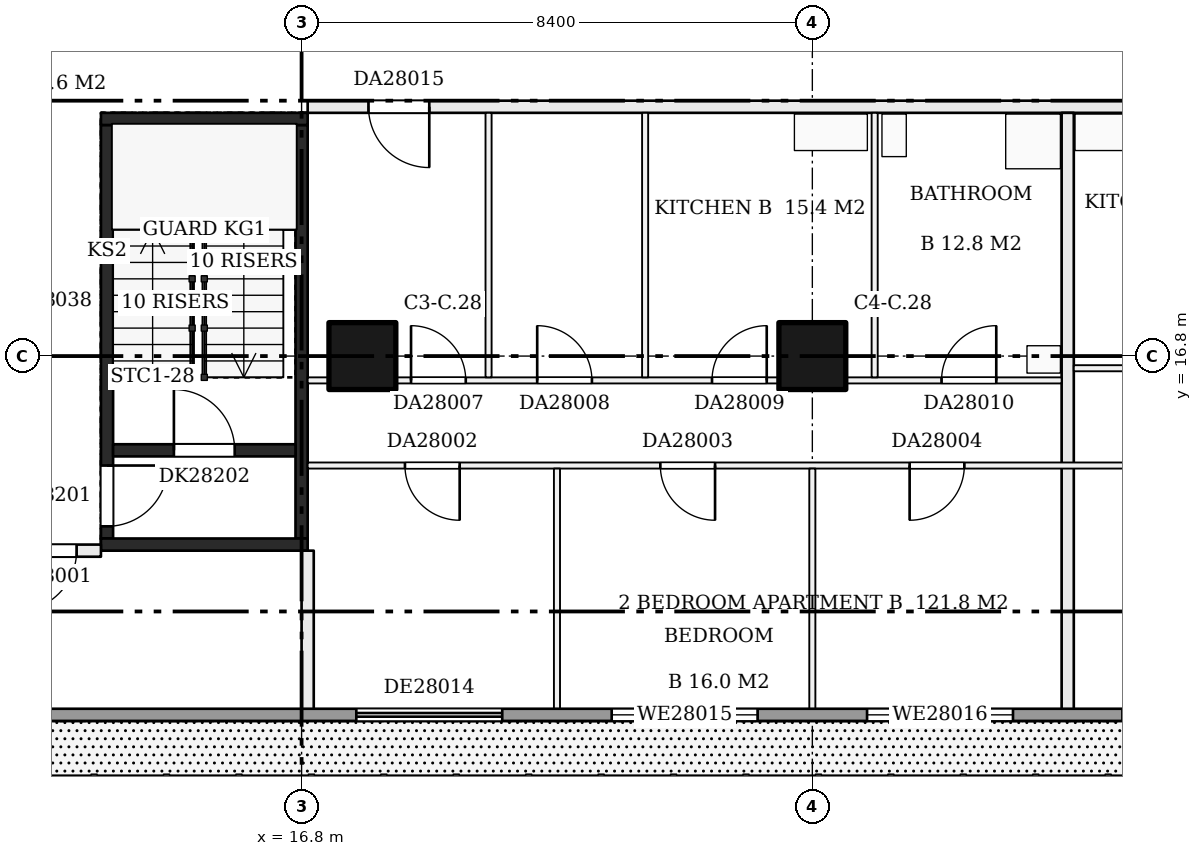
"""IFC4 building model, lengths in metres.
Left out: names, types, materials, properties, quantities, classifications, styles, units other than length and angle.
Written with IfcOpenShell. Run it as: python <this file> out.ifc"""

import sys

from ifc_helpers import new_model, si_unit, direction, frame, frame_2d, origin, origin_2d, place, context, subcontext, project, spatial, rectangle, extrude, element, fill, save


model = new_model("IFC4")
c1 = context("Model", 3, precision=1e-05, world=origin(), true_north=direction((0.0, 1.0)))
c2 = subcontext(c1, "Body", "Model", "MODEL_VIEW")
j1 = project(units=[si_unit("LENGTHUNIT", "METRE"), si_unit("PLANEANGLEUNIT", "RADIAN")], contexts=[c1])
p1 = place(None, origin())
s1 = spatial("IfcSite", under=j1, at=p1, CompositionType="ELEMENT")
p2 = place(p1, origin())
s2 = spatial("IfcBuilding", under=s1, at=p2, CompositionType="ELEMENT")
p3 = place(p2, frame((0.0, 0.0, 112.7)))
s3 = spatial("IfcBuildingStorey", under=s2, at=p3, CompositionType="ELEMENT", Elevation=112.7)
for number, where, z_axis, x_axis in (
    (1, (17.8, 16.8, 0.0), (0.0, 0.0, 1.0), (1.0, 0.0, 0.0)),
    (2, (25.2, 16.8, 0.0), (0.0, 0.0, 1.0), (1.0, 0.0, 0.0)),
):
    element("IfcColumn", number, at=place(p3, frame(where, z_axis=z_axis, x_axis=x_axis)), inside=s3, PredefinedType="COLUMN", context=c2, shape_type="SweptSolid", body=[
        extrude(rectangle(XDim=1.1, YDim=1.1, at=origin_2d()), origin(), (0.0, 0.0, 1.0), 3.22),
    ])
p4 = place(p3, frame((13.6, 13.8, 0.0), z_axis=(0.0, 0.0, 1.0), x_axis=(0.0, 1.0, 0.0)))
e3 = element("IfcWall", 3, at=p4, inside=s3, PredefinedType="SHEAR", context=c2, shape_type="SweptSolid", body=[
    extrude(rectangle(XDim=6.8, YDim=0.2, at=frame_2d((3.4, 0.0))), origin(), (0.0, 0.0, 1.0), 3.22),
])
p5 = place(p4, frame((0.2, 0.0, 0.0)))
e4 = element("IfcOpeningElement", 4, at=p5, cuts=e3, PredefinedType="OPENING", context=c2, shape_type="SweptSolid", body=[
    extrude(rectangle(XDim=1.0, YDim=2.1, at=frame_2d((0.5, 1.05))), frame((0.0, 0.11, 0.0), z_axis=(0.0, -1.0, 0.0), x_axis=(1.0, 0.0, 0.0)), (0.0, 0.0, 1.0), 0.22),
])
p6 = place(p3, frame((16.8, 13.8, 0.0), z_axis=(0.0, 0.0, 1.0), x_axis=(0.0, 1.0, 0.0)))
e5 = element("IfcWall", 5, at=p6, inside=s3, PredefinedType="SHEAR", context=c2, shape_type="SweptSolid", body=[
    extrude(rectangle(XDim=6.8, YDim=0.2, at=frame_2d((3.4, 0.0))), origin(), (0.0, 0.0, 1.0), 3.22),
])
for number, where, z_axis, x_axis in (
    (6, (13.5, 13.7, 0.0), (0.0, 0.0, 1.0), (1.0, 0.0, 0.0)),
    (7, (13.5, 20.7, 0.0), (0.0, 0.0, 1.0), (1.0, 0.0, 0.0)),
):
    element("IfcWall", number, at=place(p3, frame(where, z_axis=z_axis, x_axis=x_axis)), inside=s3, PredefinedType="SHEAR", context=c2, shape_type="SweptSolid", body=[
        extrude(rectangle(XDim=3.4, YDim=0.2, at=frame_2d((1.7, 0.0))), origin(), (0.0, 0.0, 1.0), 3.22),
    ])
p7 = place(p3, frame((13.7, 15.25, 0.0), z_axis=(0.0, 0.0, 1.0), x_axis=(1.0, 0.0, 0.0)))
e8 = element("IfcWall", 8, at=p7, inside=s3, PredefinedType="SHEAR", context=c2, shape_type="SweptSolid", body=[
    extrude(rectangle(XDim=3.0, YDim=0.2, at=frame_2d((1.5, 0.0))), origin(), (0.0, 0.0, 1.0), 3.22),
])
p8 = place(p7, frame((1.0, 0.0, 0.0)))
e9 = element("IfcOpeningElement", 9, at=p8, cuts=e8, PredefinedType="OPENING", context=c2, shape_type="SweptSolid", body=[
    extrude(rectangle(XDim=1.0, YDim=2.1, at=frame_2d((0.5, 1.05))), frame((0.0, 0.11, 0.0), z_axis=(0.0, -1.0, 0.0), x_axis=(1.0, 0.0, 0.0)), (0.0, 0.0, 1.0), 0.22),
])
p9 = place(p3, frame((11.7, 13.6, 0.0), z_axis=(0.0, 0.0, 1.0), x_axis=(1.0, 0.0, 0.0)))
e10 = element("IfcWall", 10, at=p9, inside=s3, PredefinedType="PARTITIONING", context=c2, shape_type="SweptSolid", body=[
    extrude(rectangle(XDim=1.8, YDim=0.2, at=frame_2d((0.9, 0.0))), origin(), (0.0, 0.0, 1.0), 3.22),
])
p10 = place(p9, frame((0.4, 0.0, 0.0)))
e11 = element("IfcOpeningElement", 11, at=p10, cuts=e10, PredefinedType="OPENING", context=c2, shape_type="SweptSolid", body=[
    extrude(rectangle(XDim=1.0, YDim=2.1, at=frame_2d((0.5, 1.05))), frame((0.0, 0.11, 0.0), z_axis=(0.0, -1.0, 0.0), x_axis=(1.0, 0.0, 0.0)), (0.0, 0.0, 1.0), 0.22),
])
p11 = place(p3, frame((16.9, 15.0, 0.0), z_axis=(0.0, 0.0, 1.0), x_axis=(1.0, 0.0, 0.0)))
e12 = element("IfcWall", 12, at=p11, inside=s3, PredefinedType="PARTITIONING", context=c2, shape_type="SweptSolid", body=[
    extrude(rectangle(XDim=23.1, YDim=0.1, at=frame_2d((11.55, 0.0))), origin(), (0.0, 0.0, 1.0), 3.22),
])
p12 = place(p11, frame((1.6, 0.0, 0.0)))
e13 = element("IfcOpeningElement", 13, at=p12, cuts=e12, PredefinedType="OPENING", context=c2, shape_type="SweptSolid", body=[
    extrude(rectangle(XDim=0.9, YDim=2.1, at=frame_2d((0.45, 1.05))), frame((0.0, 0.06, 0.0), z_axis=(0.0, -1.0, 0.0), x_axis=(1.0, 0.0, 0.0)), (0.0, 0.0, 1.0), 0.12),
])
p13 = place(p11, frame((5.8, 0.0, 0.0)))
e14 = element("IfcOpeningElement", 14, at=p13, cuts=e12, PredefinedType="OPENING", context=c2, shape_type="SweptSolid", body=[
    extrude(rectangle(XDim=0.9, YDim=2.1, at=frame_2d((0.45, 1.05))), frame((0.0, 0.06, 0.0), z_axis=(0.0, -1.0, 0.0), x_axis=(1.0, 0.0, 0.0)), (0.0, 0.0, 1.0), 0.12),
])
p14 = place(p11, frame((9.9, 0.0, 0.0)))
e15 = element("IfcOpeningElement", 15, at=p14, cuts=e12, PredefinedType="OPENING", context=c2, shape_type="SweptSolid", body=[
    extrude(rectangle(XDim=0.9, YDim=2.1, at=frame_2d((0.45, 1.05))), frame((0.0, 0.06, 0.0), z_axis=(0.0, -1.0, 0.0), x_axis=(1.0, 0.0, 0.0)), (0.0, 0.0, 1.0), 0.12),
])
p15 = place(p11, frame((14.1, 0.0, 0.0)))
e16 = element("IfcOpeningElement", 16, at=p15, cuts=e12, PredefinedType="OPENING", context=c2, shape_type="SweptSolid", body=[
    extrude(rectangle(XDim=0.9, YDim=2.1, at=frame_2d((0.45, 1.05))), frame((0.0, 0.06, 0.0), z_axis=(0.0, -1.0, 0.0), x_axis=(1.0, 0.0, 0.0)), (0.0, 0.0, 1.0), 0.12),
])
p16 = place(p11, frame((19.5, 0.0, 0.0)))
e17 = element("IfcOpeningElement", 17, at=p16, cuts=e12, PredefinedType="OPENING", context=c2, shape_type="SweptSolid", body=[
    extrude(rectangle(XDim=0.9, YDim=2.1, at=frame_2d((0.45, 1.05))), frame((0.0, 0.06, 0.0), z_axis=(0.0, -1.0, 0.0), x_axis=(1.0, 0.0, 0.0)), (0.0, 0.0, 1.0), 0.12),
])
p17 = place(p3, frame((16.9, 16.4, 0.0), z_axis=(0.0, 0.0, 1.0), x_axis=(1.0, 0.0, 0.0)))
e18 = element("IfcWall", 18, at=p17, inside=s3, PredefinedType="PARTITIONING", context=c2, shape_type="SweptSolid", body=[
    extrude(rectangle(XDim=12.4, YDim=0.1, at=frame_2d((6.2, 0.0))), origin(), (0.0, 0.0, 1.0), 3.22),
])
p18 = place(p17, frame((1.7, 0.0, 0.0)))
e19 = element("IfcOpeningElement", 19, at=p18, cuts=e18, PredefinedType="OPENING", context=c2, shape_type="SweptSolid", body=[
    extrude(rectangle(XDim=0.9, YDim=2.1, at=frame_2d((0.45, 1.05))), frame((0.0, 0.06, 0.0), z_axis=(0.0, -1.0, 0.0), x_axis=(1.0, 0.0, 0.0)), (0.0, 0.0, 1.0), 0.12),
])
p19 = place(p17, frame((3.775, 0.0, 0.0)))
e20 = element("IfcOpeningElement", 20, at=p19, cuts=e18, PredefinedType="OPENING", context=c2, shape_type="SweptSolid", body=[
    extrude(rectangle(XDim=0.9, YDim=2.1, at=frame_2d((0.45, 1.05))), frame((0.0, 0.06, 0.0), z_axis=(0.0, -1.0, 0.0), x_axis=(1.0, 0.0, 0.0)), (0.0, 0.0, 1.0), 0.12),
])
p20 = place(p17, frame((6.65, 0.0, 0.0)))
e21 = element("IfcOpeningElement", 21, at=p20, cuts=e18, PredefinedType="OPENING", context=c2, shape_type="SweptSolid", body=[
    extrude(rectangle(XDim=0.9, YDim=2.1, at=frame_2d((0.45, 1.05))), frame((0.0, 0.06, 0.0), z_axis=(0.0, -1.0, 0.0), x_axis=(1.0, 0.0, 0.0)), (0.0, 0.0, 1.0), 0.12),
])
p21 = place(p17, frame((10.425, 0.0, 0.0)))
e22 = element("IfcOpeningElement", 22, at=p21, cuts=e18, PredefinedType="OPENING", context=c2, shape_type="SweptSolid", body=[
    extrude(rectangle(XDim=0.9, YDim=2.1, at=frame_2d((0.45, 1.05))), frame((0.0, 0.06, 0.0), z_axis=(0.0, -1.0, 0.0), x_axis=(1.0, 0.0, 0.0)), (0.0, 0.0, 1.0), 0.12),
])
p22 = place(p3, frame((29.5, 16.6, 0.0), z_axis=(0.0, 0.0, 1.0), x_axis=(1.0, 0.0, 0.0)))
e23 = element("IfcWall", 23, at=p22, inside=s3, PredefinedType="PARTITIONING", context=c2, shape_type="SweptSolid", body=[
    extrude(rectangle(XDim=10.5, YDim=0.1, at=frame_2d((5.25, 0.0))), origin(), (0.0, 0.0, 1.0), 3.22),
])
p23 = place(p22, frame((5.133, 0.0, 0.0)))
e24 = element("IfcOpeningElement", 24, at=p23, cuts=e23, PredefinedType="OPENING", context=c2, shape_type="SweptSolid", body=[
    extrude(rectangle(XDim=0.9, YDim=2.1, at=frame_2d((0.45, 1.05))), frame((0.0, 0.06, 0.0), z_axis=(0.0, -1.0, 0.0), x_axis=(1.0, 0.0, 0.0)), (0.0, 0.0, 1.0), 0.12),
])
p24 = place(p22, frame((1.5, 0.0, 0.0)))
e25 = element("IfcOpeningElement", 25, at=p24, cuts=e23, PredefinedType="OPENING", context=c2, shape_type="SweptSolid", body=[
    extrude(rectangle(XDim=0.9, YDim=2.1, at=frame_2d((0.45, 1.05))), frame((0.0, 0.06, 0.0), z_axis=(0.0, -1.0, 0.0), x_axis=(1.0, 0.0, 0.0)), (0.0, 0.0, 1.0), 0.12),
])
p25 = place(p22, frame((8.467, 0.0, 0.0)))
e26 = element("IfcOpeningElement", 26, at=p25, cuts=e23, PredefinedType="OPENING", context=c2, shape_type="SweptSolid", body=[
    extrude(rectangle(XDim=0.9, YDim=2.1, at=frame_2d((0.45, 1.05))), frame((0.0, 0.06, 0.0), z_axis=(0.0, -1.0, 0.0), x_axis=(1.0, 0.0, 0.0)), (0.0, 0.0, 1.0), 0.12),
])
p26 = place(p3, frame((16.9, 20.9, 0.0), z_axis=(0.0, 0.0, 1.0), x_axis=(1.0, 0.0, 0.0)))
e27 = element("IfcWall", 27, at=p26, inside=s3, PredefinedType="PARTITIONING", context=c2, shape_type="SweptSolid", body=[
    extrude(rectangle(XDim=23.3, YDim=0.2, at=frame_2d((11.65, 0.0))), origin(), (0.0, 0.0, 1.0), 3.22),
])
p27 = place(p26, frame((1.0, 0.0, 0.0)))
e28 = element("IfcOpeningElement", 28, at=p27, cuts=e27, PredefinedType="OPENING", context=c2, shape_type="SweptSolid", body=[
    extrude(rectangle(XDim=1.0, YDim=2.1, at=frame_2d((0.5, 1.05))), frame((0.0, 0.11, 0.0), z_axis=(0.0, -1.0, 0.0), x_axis=(1.0, 0.0, 0.0)), (0.0, 0.0, 1.0), 0.22),
])
p28 = place(p26, frame((17.633, 0.0, 0.0)))
e29 = element("IfcOpeningElement", 29, at=p28, cuts=e27, PredefinedType="OPENING", context=c2, shape_type="SweptSolid", body=[
    extrude(rectangle(XDim=1.0, YDim=2.1, at=frame_2d((0.5, 1.05))), frame((0.0, 0.11, 0.0), z_axis=(0.0, -1.0, 0.0), x_axis=(1.0, 0.0, 0.0)), (0.0, 0.0, 1.0), 0.22),
])
p29 = place(p3, frame((16.9, 10.9, 0.0), z_axis=(0.0, 0.0, 1.0), x_axis=(0.0, 1.0, 0.0)))
e30 = element("IfcWall", 30, at=p29, inside=s3, PredefinedType="PARTITIONING", context=c2, shape_type="SweptSolid", body=[
    extrude(rectangle(XDim=2.7, YDim=0.2, at=frame_2d((1.35, 0.0))), origin(), (0.0, 0.0, 1.0), 3.22),
])
p30 = place(p3, frame((19.875, 16.45, 0.0), z_axis=(0.0, 0.0, 1.0), x_axis=(0.0, 1.0, 0.0)))
e31 = element("IfcWall", 31, at=p30, inside=s3, PredefinedType="PARTITIONING", context=c2, shape_type="SweptSolid", body=[
    extrude(rectangle(XDim=4.35, YDim=0.1, at=frame_2d((2.175, 0.0))), origin(), (0.0, 0.0, 1.0), 3.22),
])
p31 = place(p3, frame((21.0, 10.9, 0.0), z_axis=(0.0, 0.0, 1.0), x_axis=(0.0, 1.0, 0.0)))
e32 = element("IfcWall", 32, at=p31, inside=s3, PredefinedType="PARTITIONING", context=c2, shape_type="SweptSolid", body=[
    extrude(rectangle(XDim=4.05, YDim=0.1, at=frame_2d((2.025, 0.0))), origin(), (0.0, 0.0, 1.0), 3.22),
])
p32 = place(p3, frame((22.45, 16.45, 0.0), z_axis=(0.0, 0.0, 1.0), x_axis=(0.0, 1.0, 0.0)))
e33 = element("IfcWall", 33, at=p32, inside=s3, PredefinedType="PARTITIONING", context=c2, shape_type="SweptSolid", body=[
    extrude(rectangle(XDim=4.35, YDim=0.1, at=frame_2d((2.175, 0.0))), origin(), (0.0, 0.0, 1.0), 3.22),
])
p33 = place(p3, frame((25.2, 10.9, 0.0), z_axis=(0.0, 0.0, 1.0), x_axis=(0.0, 1.0, 0.0)))
e34 = element("IfcWall", 34, at=p33, inside=s3, PredefinedType="PARTITIONING", context=c2, shape_type="SweptSolid", body=[
    extrude(rectangle(XDim=4.05, YDim=0.1, at=frame_2d((2.025, 0.0))), origin(), (0.0, 0.0, 1.0), 3.22),
])
p34 = place(p3, frame((26.225, 16.45, 0.0), z_axis=(0.0, 0.0, 1.0), x_axis=(0.0, 1.0, 0.0)))
e35 = element("IfcWall", 35, at=p34, inside=s3, PredefinedType="PARTITIONING", context=c2, shape_type="SweptSolid", body=[
    extrude(rectangle(XDim=4.35, YDim=0.1, at=frame_2d((2.175, 0.0))), origin(), (0.0, 0.0, 1.0), 3.22),
])
p35 = place(p3, frame((29.4, 10.9, 0.0), z_axis=(0.0, 0.0, 1.0), x_axis=(0.0, 1.0, 0.0)))
e36 = element("IfcWall", 36, at=p35, inside=s3, PredefinedType="PARTITIONING", context=c2, shape_type="SweptSolid", body=[
    extrude(rectangle(XDim=9.9, YDim=0.2, at=frame_2d((4.95, 0.0))), origin(), (0.0, 0.0, 1.0), 3.22),
])
p36 = place(p3, frame((4.8, 10.9, 0.0), z_axis=(0.0, 0.0, 1.0), x_axis=(1.0, 0.0, 0.0)))
e37 = element("IfcWall", 37, at=p36, inside=s3, PredefinedType="SOLIDWALL", context=c2, shape_type="SweptSolid", body=[
    extrude(rectangle(XDim=37.2, YDim=0.2, at=frame_2d((18.6, 0.0))), origin(), (0.0, 0.0, 1.0), 3.22),
])
p37 = place(p36, frame((0.3, 0.0, 0.9)))
e38 = element("IfcOpeningElement", 38, at=p37, cuts=e37, PredefinedType="OPENING", context=c2, shape_type="SweptSolid", body=[
    extrude(rectangle(XDim=2.4, YDim=1.5, at=frame_2d((1.2, 0.75))), frame((0.0, 0.11, 0.0), z_axis=(0.0, -1.0, 0.0), x_axis=(1.0, 0.0, 0.0)), (0.0, 0.0, 1.0), 0.22),
])
p38 = place(p36, frame((4.2, 0.0, 0.9)))
e39 = element("IfcOpeningElement", 39, at=p38, cuts=e37, PredefinedType="OPENING", context=c2, shape_type="SweptSolid", body=[
    extrude(rectangle(XDim=2.4, YDim=1.5, at=frame_2d((1.2, 0.75))), frame((0.0, 0.11, 0.0), z_axis=(0.0, -1.0, 0.0), x_axis=(1.0, 0.0, 0.0)), (0.0, 0.0, 1.0), 0.22),
])
p39 = place(p36, frame((12.9, 0.0, 0.0)))
e40 = element("IfcOpeningElement", 40, at=p39, cuts=e37, PredefinedType="OPENING", context=c2, shape_type="SweptSolid", body=[
    extrude(rectangle(XDim=2.4, YDim=2.2, at=frame_2d((1.2, 1.1))), frame((0.0, 0.11, 0.0), z_axis=(0.0, -1.0, 0.0), x_axis=(1.0, 0.0, 0.0)), (0.0, 0.0, 1.0), 0.22),
])
p40 = place(p36, frame((17.1, 0.0, 0.9)))
e41 = element("IfcOpeningElement", 41, at=p40, cuts=e37, PredefinedType="OPENING", context=c2, shape_type="SweptSolid", body=[
    extrude(rectangle(XDim=2.4, YDim=1.5, at=frame_2d((1.2, 0.75))), frame((0.0, 0.11, 0.0), z_axis=(0.0, -1.0, 0.0), x_axis=(1.0, 0.0, 0.0)), (0.0, 0.0, 1.0), 0.22),
])
p41 = place(p36, frame((21.3, 0.0, 0.9)))
e42 = element("IfcOpeningElement", 42, at=p41, cuts=e37, PredefinedType="OPENING", context=c2, shape_type="SweptSolid", body=[
    extrude(rectangle(XDim=2.4, YDim=1.5, at=frame_2d((1.2, 0.75))), frame((0.0, 0.11, 0.0), z_axis=(0.0, -1.0, 0.0), x_axis=(1.0, 0.0, 0.0)), (0.0, 0.0, 1.0), 0.22),
])
p42 = place(p36, frame((25.5, 0.0, 0.0)))
e43 = element("IfcOpeningElement", 43, at=p42, cuts=e37, PredefinedType="OPENING", context=c2, shape_type="SweptSolid", body=[
    extrude(rectangle(XDim=2.4, YDim=2.2, at=frame_2d((1.2, 1.1))), frame((0.0, 0.11, 0.0), z_axis=(0.0, -1.0, 0.0), x_axis=(1.0, 0.0, 0.0)), (0.0, 0.0, 1.0), 0.22),
])
p43 = place(p36, frame((29.7, 0.0, 0.9)))
e44 = element("IfcOpeningElement", 44, at=p43, cuts=e37, PredefinedType="OPENING", context=c2, shape_type="SweptSolid", body=[
    extrude(rectangle(XDim=2.4, YDim=1.5, at=frame_2d((1.2, 0.75))), frame((0.0, 0.11, 0.0), z_axis=(0.0, -1.0, 0.0), x_axis=(1.0, 0.0, 0.0)), (0.0, 0.0, 1.0), 0.22),
])
p44 = place(p36, frame((33.9, 0.0, 0.9)))
e45 = element("IfcOpeningElement", 45, at=p44, cuts=e37, PredefinedType="OPENING", context=c2, shape_type="SweptSolid", body=[
    extrude(rectangle(XDim=1.3, YDim=1.5, at=frame_2d((0.65, 0.75))), frame((0.0, 0.11, 0.0), z_axis=(0.0, -1.0, 0.0), x_axis=(1.0, 0.0, 0.0)), (0.0, 0.0, 1.0), 0.22),
])
p45 = place(p5, frame((1.0, 0.0, 0.0), z_axis=(0.0, 0.0, 1.0), x_axis=(-1.0, 0.0, 0.0)))
e46 = element("IfcDoor", 46, at=p45, inside=s3, OperationType="SINGLE_SWING_LEFT", PredefinedType="DOOR", context=c2, shape_type="SweptSolid", body=[
    extrude(rectangle(XDim=1.0, YDim=2.1, at=frame_2d((0.5, 1.05))), frame((0.0, 0.025, 0.0), z_axis=(0.0, -1.0, 0.0), x_axis=(1.0, 0.0, 0.0)), (0.0, 0.0, 1.0), 0.05),
])
fill(e4, e46)
p46 = place(p8, origin())
e47 = element("IfcDoor", 47, at=p46, inside=s3, OperationType="SINGLE_SWING_LEFT", PredefinedType="DOOR", context=c2, shape_type="SweptSolid", body=[
    extrude(rectangle(XDim=1.0, YDim=2.1, at=frame_2d((0.5, 1.05))), frame((0.0, 0.025, 0.0), z_axis=(0.0, -1.0, 0.0), x_axis=(1.0, 0.0, 0.0)), (0.0, 0.0, 1.0), 0.05),
])
fill(e9, e47)
p47 = place(p10, frame((1.0, 0.0, 0.0), z_axis=(0.0, 0.0, 1.0), x_axis=(-1.0, 0.0, 0.0)))
e48 = element("IfcDoor", 48, at=p47, inside=s3, OperationType="SINGLE_SWING_RIGHT", PredefinedType="DOOR", context=c2, shape_type="SweptSolid", body=[
    extrude(rectangle(XDim=1.0, YDim=2.1, at=frame_2d((0.5, 1.05))), frame((0.0, 0.025, 0.0), z_axis=(0.0, -1.0, 0.0), x_axis=(1.0, 0.0, 0.0)), (0.0, 0.0, 1.0), 0.05),
])
fill(e11, e48)
p48 = place(p12, frame((0.9, 0.0, 0.0), z_axis=(0.0, 0.0, 1.0), x_axis=(-1.0, 0.0, 0.0)))
e49 = element("IfcDoor", 49, at=p48, inside=s3, OperationType="SINGLE_SWING_LEFT", PredefinedType="DOOR", context=c2, shape_type="SweptSolid", body=[
    extrude(rectangle(XDim=0.9, YDim=2.1, at=frame_2d((0.45, 1.05))), frame((0.0, 0.025, 0.0), z_axis=(0.0, -1.0, 0.0), x_axis=(1.0, 0.0, 0.0)), (0.0, 0.0, 1.0), 0.05),
])
fill(e13, e49)
p49 = place(p13, frame((0.9, 0.0, 0.0), z_axis=(0.0, 0.0, 1.0), x_axis=(-1.0, 0.0, 0.0)))
e50 = element("IfcDoor", 50, at=p49, inside=s3, OperationType="SINGLE_SWING_LEFT", PredefinedType="DOOR", context=c2, shape_type="SweptSolid", body=[
    extrude(rectangle(XDim=0.9, YDim=2.1, at=frame_2d((0.45, 1.05))), frame((0.0, 0.025, 0.0), z_axis=(0.0, -1.0, 0.0), x_axis=(1.0, 0.0, 0.0)), (0.0, 0.0, 1.0), 0.05),
])
fill(e14, e50)
p50 = place(p14, frame((0.9, 0.0, 0.0), z_axis=(0.0, 0.0, 1.0), x_axis=(-1.0, 0.0, 0.0)))
e51 = element("IfcDoor", 51, at=p50, inside=s3, OperationType="SINGLE_SWING_RIGHT", PredefinedType="DOOR", context=c2, shape_type="SweptSolid", body=[
    extrude(rectangle(XDim=0.9, YDim=2.1, at=frame_2d((0.45, 1.05))), frame((0.0, 0.025, 0.0), z_axis=(0.0, -1.0, 0.0), x_axis=(1.0, 0.0, 0.0)), (0.0, 0.0, 1.0), 0.05),
])
fill(e15, e51)
p51 = place(p18, origin())
e52 = element("IfcDoor", 52, at=p51, inside=s3, OperationType="SINGLE_SWING_LEFT", PredefinedType="DOOR", context=c2, shape_type="SweptSolid", body=[
    extrude(rectangle(XDim=0.9, YDim=2.1, at=frame_2d((0.45, 1.05))), frame((0.0, 0.025, 0.0), z_axis=(0.0, -1.0, 0.0), x_axis=(1.0, 0.0, 0.0)), (0.0, 0.0, 1.0), 0.05),
])
fill(e19, e52)
p52 = place(p19, origin())
e53 = element("IfcDoor", 53, at=p52, inside=s3, OperationType="SINGLE_SWING_LEFT", PredefinedType="DOOR", context=c2, shape_type="SweptSolid", body=[
    extrude(rectangle(XDim=0.9, YDim=2.1, at=frame_2d((0.45, 1.05))), frame((0.0, 0.025, 0.0), z_axis=(0.0, -1.0, 0.0), x_axis=(1.0, 0.0, 0.0)), (0.0, 0.0, 1.0), 0.05),
])
fill(e20, e53)
p53 = place(p20, origin())
e54 = element("IfcDoor", 54, at=p53, inside=s3, OperationType="SINGLE_SWING_RIGHT", PredefinedType="DOOR", context=c2, shape_type="SweptSolid", body=[
    extrude(rectangle(XDim=0.9, YDim=2.1, at=frame_2d((0.45, 1.05))), frame((0.0, 0.025, 0.0), z_axis=(0.0, -1.0, 0.0), x_axis=(1.0, 0.0, 0.0)), (0.0, 0.0, 1.0), 0.05),
])
fill(e21, e54)
p54 = place(p21, origin())
e55 = element("IfcDoor", 55, at=p54, inside=s3, OperationType="SINGLE_SWING_RIGHT", PredefinedType="DOOR", context=c2, shape_type="SweptSolid", body=[
    extrude(rectangle(XDim=0.9, YDim=2.1, at=frame_2d((0.45, 1.05))), frame((0.0, 0.025, 0.0), z_axis=(0.0, -1.0, 0.0), x_axis=(1.0, 0.0, 0.0)), (0.0, 0.0, 1.0), 0.05),
])
fill(e22, e55)
p55 = place(p27, frame((1.0, 0.0, 0.0), z_axis=(0.0, 0.0, 1.0), x_axis=(-1.0, 0.0, 0.0)))
e56 = element("IfcDoor", 56, at=p55, inside=s3, OperationType="SINGLE_SWING_LEFT", PredefinedType="DOOR", context=c2, shape_type="SweptSolid", body=[
    extrude(rectangle(XDim=1.0, YDim=2.1, at=frame_2d((0.5, 1.05))), frame((0.0, 0.025, 0.0), z_axis=(0.0, -1.0, 0.0), x_axis=(1.0, 0.0, 0.0)), (0.0, 0.0, 1.0), 0.05),
])
fill(e28, e56)
p56 = place(p39, origin())
e57 = element("IfcDoor", 57, at=p56, inside=s3, OperationType="DOUBLE_DOOR_SLIDING", PredefinedType="DOOR", context=c2, shape_type="SweptSolid", body=[
    extrude(rectangle(XDim=2.4, YDim=2.2, at=frame_2d((1.2, 1.1))), frame((0.0, 0.025, 0.0), z_axis=(0.0, -1.0, 0.0), x_axis=(1.0, 0.0, 0.0)), (0.0, 0.0, 1.0), 0.05),
])
fill(e40, e57)
p57 = place(p40, origin())
e58 = element("IfcWindow", 58, at=p57, inside=s3, PartitioningType="SINGLE_PANEL", PredefinedType="WINDOW", context=c2, shape_type="SweptSolid", body=[
    extrude(rectangle(XDim=2.4, YDim=1.5, at=frame_2d((1.2, 0.75))), frame((0.0, 0.03, 0.0), z_axis=(0.0, -1.0, 0.0), x_axis=(1.0, 0.0, 0.0)), (0.0, 0.0, 1.0), 0.06),
])
fill(e41, e58)
p58 = place(p41, origin())
e59 = element("IfcWindow", 59, at=p58, inside=s3, PartitioningType="SINGLE_PANEL", PredefinedType="WINDOW", context=c2, shape_type="SweptSolid", body=[
    extrude(rectangle(XDim=2.4, YDim=1.5, at=frame_2d((1.2, 0.75))), frame((0.0, 0.03, 0.0), z_axis=(0.0, -1.0, 0.0), x_axis=(1.0, 0.0, 0.0)), (0.0, 0.0, 1.0), 0.06),
])
fill(e42, e59)
save(model, sys.argv[1])
